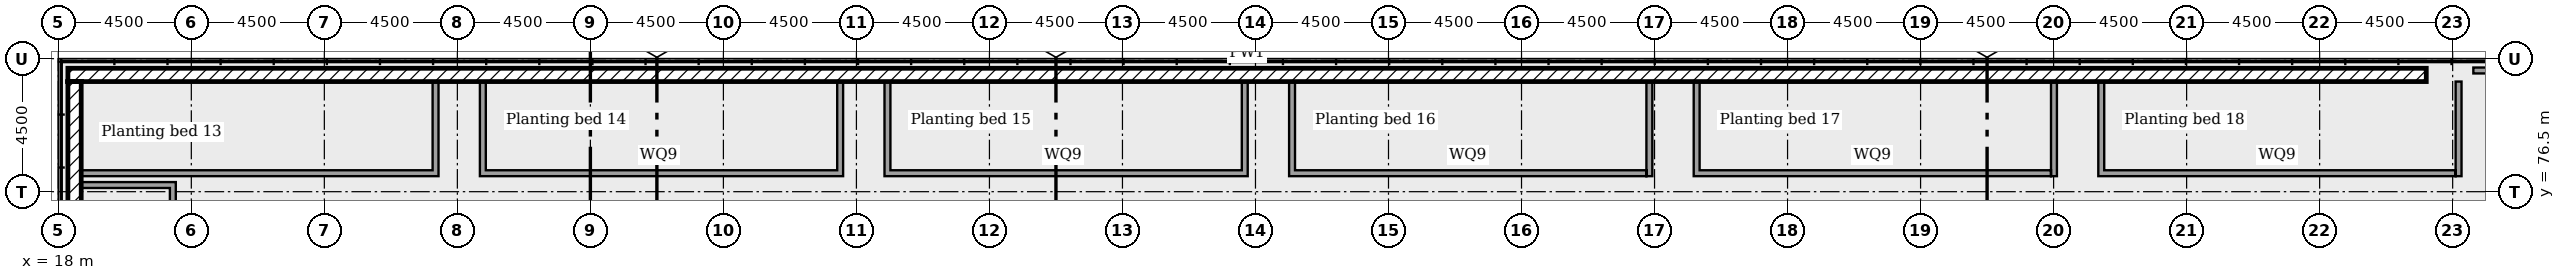
"""IFC4 building model, lengths in metres.
Left out: names, types, materials, properties, quantities, classifications, styles, units other than length and angle.
Written with IfcOpenShell. Run it as: python <this file> out.ifc"""

import sys

from ifc_helpers import new_model, si_unit, direction, frame, frame_2d, origin, place, context, subcontext, project, spatial, rectangle, extrude, element, save


model = new_model("IFC4")
c1 = context("Model", 3, precision=1e-05, world=origin(), true_north=direction((0.0, 1.0)))
c2 = subcontext(c1, "Body", "Model", "MODEL_VIEW")
j1 = project(units=[si_unit("LENGTHUNIT", "METRE"), si_unit("PLANEANGLEUNIT", "RADIAN")], contexts=[c1])
p1 = place(None, origin())
s1 = spatial("IfcSite", under=j1, at=p1, CompositionType="ELEMENT")
p2 = place(p1, origin())
s2 = spatial("IfcBuilding", under=s1, at=p2, CompositionType="ELEMENT")
p3 = place(p2, frame((0.0, 0.0, 16.5)))
s3 = spatial("IfcBuildingStorey", under=s2, at=p3, CompositionType="ELEMENT", Elevation=16.5)
p4 = place(p3, frame((98.107, 80.45, 0.0), z_axis=(0.0, 0.0, 1.0), x_axis=(-1.0, 0.0, 0.0)))
e1 = element("IfcWall", 1, at=p4, inside=s3, PredefinedType="SOLIDWALL", context=c2, shape_type="SweptSolid", body=[
    extrude(rectangle(XDim=79.782, YDim=0.45, at=frame_2d((39.891, 0.0))), origin(), (0.0, 0.0, 1.0), 0.6),
])
p5 = place(p3, frame((18.55, 80.225, 0.0), z_axis=(0.0, 0.0, 1.0), x_axis=(0.0, -1.0, 0.0)))
e2 = element("IfcWall", 2, at=p5, inside=s3, PredefinedType="SOLIDWALL", context=c2, shape_type="SweptSolid", body=[
    extrude(rectangle(XDim=47.133, YDim=0.45, at=frame_2d((23.566, 0.0))), origin(), (0.0, 0.0, 1.0), 0.6),
])
p6 = place(p3, frame((30.762, 77.025, 0.0), z_axis=(0.0, 0.0, 1.0), x_axis=(0.0, 1.0, 0.0)))
e3 = element("IfcWall", 3, at=p6, inside=s3, PredefinedType="SOLIDWALL", context=c2, shape_type="SweptSolid", body=[
    extrude(rectangle(XDim=3.2, YDim=0.2, at=frame_2d((1.6, 0.0))), origin(), (0.0, 0.0, 1.0), 0.45),
])
p7 = place(p3, frame((18.775, 77.125, 0.0)))
e4 = element("IfcWall", 4, at=p7, inside=s3, PredefinedType="SOLIDWALL", context=c2, shape_type="SweptSolid", body=[
    extrude(rectangle(XDim=11.888, YDim=0.2, at=frame_2d((5.944, 0.0))), origin(), (0.0, 0.0, 1.0), 0.45),
])
p8 = place(p3, frame((44.45, 77.025, 0.0), z_axis=(0.0, 0.0, 1.0), x_axis=(0.0, 1.0, 0.0)))
e5 = element("IfcWall", 5, at=p8, inside=s3, PredefinedType="SOLIDWALL", context=c2, shape_type="SweptSolid", body=[
    extrude(rectangle(XDim=3.2, YDim=0.2, at=frame_2d((1.6, 0.0))), origin(), (0.0, 0.0, 1.0), 0.45),
])
p9 = place(p3, frame((32.262, 77.125, 0.0)))
e6 = element("IfcWall", 6, at=p9, inside=s3, PredefinedType="SOLIDWALL", context=c2, shape_type="SweptSolid", body=[
    extrude(rectangle(XDim=12.088, YDim=0.2, at=frame_2d((6.044, 0.0))), origin(), (0.0, 0.0, 1.0), 0.45),
])
p10 = place(p3, frame((32.363, 77.225, 0.0), z_axis=(0.0, 0.0, 1.0), x_axis=(0.0, 1.0, 0.0)))
e7 = element("IfcWall", 7, at=p10, inside=s3, PredefinedType="SOLIDWALL", context=c2, shape_type="SweptSolid", body=[
    extrude(rectangle(XDim=3.0, YDim=0.2, at=frame_2d((1.5, 0.0))), origin(), (0.0, 0.0, 1.0), 0.45),
])
p11 = place(p3, frame((58.137, 77.025, 0.0), z_axis=(0.0, 0.0, 1.0), x_axis=(0.0, 1.0, 0.0)))
e8 = element("IfcWall", 8, at=p11, inside=s3, PredefinedType="SOLIDWALL", context=c2, shape_type="SweptSolid", body=[
    extrude(rectangle(XDim=3.2, YDim=0.2, at=frame_2d((1.6, 0.0))), origin(), (0.0, 0.0, 1.0), 0.45),
])
p12 = place(p3, frame((45.95, 77.125, 0.0)))
e9 = element("IfcWall", 9, at=p12, inside=s3, PredefinedType="SOLIDWALL", context=c2, shape_type="SweptSolid", body=[
    extrude(rectangle(XDim=12.088, YDim=0.2, at=frame_2d((6.044, 0.0))), origin(), (0.0, 0.0, 1.0), 0.45),
])
p13 = place(p3, frame((46.05, 77.225, 0.0), z_axis=(0.0, 0.0, 1.0), x_axis=(0.0, 1.0, 0.0)))
e10 = element("IfcWall", 10, at=p13, inside=s3, PredefinedType="SOLIDWALL", context=c2, shape_type="SweptSolid", body=[
    extrude(rectangle(XDim=3.0, YDim=0.2, at=frame_2d((1.5, 0.0))), origin(), (0.0, 0.0, 1.0), 0.45),
])
p14 = place(p3, frame((71.825, 77.025, 0.0), z_axis=(0.0, 0.0, 1.0), x_axis=(0.0, 1.0, 0.0)))
e11 = element("IfcWall", 11, at=p14, inside=s3, PredefinedType="SOLIDWALL", context=c2, shape_type="SweptSolid", body=[
    extrude(rectangle(XDim=3.2, YDim=0.2, at=frame_2d((1.6, 0.0))), origin(), (0.0, 0.0, 1.0), 0.45),
])
p15 = place(p3, frame((59.637, 77.125, 0.0)))
e12 = element("IfcWall", 12, at=p15, inside=s3, PredefinedType="SOLIDWALL", context=c2, shape_type="SweptSolid", body=[
    extrude(rectangle(XDim=12.088, YDim=0.2, at=frame_2d((6.044, 0.0))), origin(), (0.0, 0.0, 1.0), 0.45),
])
p16 = place(p3, frame((59.738, 77.225, 0.0), z_axis=(0.0, 0.0, 1.0), x_axis=(0.0, 1.0, 0.0)))
e13 = element("IfcWall", 13, at=p16, inside=s3, PredefinedType="SOLIDWALL", context=c2, shape_type="SweptSolid", body=[
    extrude(rectangle(XDim=3.0, YDim=0.2, at=frame_2d((1.5, 0.0))), origin(), (0.0, 0.0, 1.0), 0.45),
])
p17 = place(p3, frame((85.512, 77.025, 0.0), z_axis=(0.0, 0.0, 1.0), x_axis=(0.0, 1.0, 0.0)))
e14 = element("IfcWall", 14, at=p17, inside=s3, PredefinedType="SOLIDWALL", context=c2, shape_type="SweptSolid", body=[
    extrude(rectangle(XDim=3.2, YDim=0.2, at=frame_2d((1.6, 0.0))), origin(), (0.0, 0.0, 1.0), 0.45),
])
p18 = place(p3, frame((73.325, 77.125, 0.0)))
e15 = element("IfcWall", 15, at=p18, inside=s3, PredefinedType="SOLIDWALL", context=c2, shape_type="SweptSolid", body=[
    extrude(rectangle(XDim=12.088, YDim=0.2, at=frame_2d((6.044, 0.0))), origin(), (0.0, 0.0, 1.0), 0.45),
])
p19 = place(p3, frame((73.425, 77.225, 0.0), z_axis=(0.0, 0.0, 1.0), x_axis=(0.0, 1.0, 0.0)))
e16 = element("IfcWall", 16, at=p19, inside=s3, PredefinedType="SOLIDWALL", context=c2, shape_type="SweptSolid", body=[
    extrude(rectangle(XDim=3.0, YDim=0.2, at=frame_2d((1.5, 0.0))), origin(), (0.0, 0.0, 1.0), 0.45),
])
p20 = place(p3, frame((99.2, 77.025, 0.0), z_axis=(0.0, 0.0, 1.0), x_axis=(0.0, 1.0, 0.0)))
e17 = element("IfcWall", 17, at=p20, inside=s3, PredefinedType="SOLIDWALL", context=c2, shape_type="SweptSolid", body=[
    extrude(rectangle(XDim=3.2, YDim=0.2, at=frame_2d((1.6, 0.0))), origin(), (0.0, 0.0, 1.0), 0.45),
])
p21 = place(p3, frame((87.012, 77.125, 0.0)))
e18 = element("IfcWall", 18, at=p21, inside=s3, PredefinedType="SOLIDWALL", context=c2, shape_type="SweptSolid", body=[
    extrude(rectangle(XDim=12.088, YDim=0.2, at=frame_2d((6.044, 0.0))), origin(), (0.0, 0.0, 1.0), 0.45),
])
p22 = place(p3, frame((87.113, 77.225, 0.0), z_axis=(0.0, 0.0, 1.0), x_axis=(0.0, 1.0, 0.0)))
e19 = element("IfcWall", 19, at=p22, inside=s3, PredefinedType="SOLIDWALL", context=c2, shape_type="SweptSolid", body=[
    extrude(rectangle(XDim=3.0, YDim=0.2, at=frame_2d((1.5, 0.0))), origin(), (0.0, 0.0, 1.0), 0.45),
])
p23 = place(p3, frame((21.875, 62.783, 0.0), z_axis=(0.0, 0.0, 1.0), x_axis=(0.0, 1.0, 0.0)))
e20 = element("IfcWall", 20, at=p23, inside=s3, PredefinedType="SOLIDWALL", context=c2, shape_type="SweptSolid", body=[
    extrude(rectangle(XDim=14.042, YDim=0.2, at=frame_2d((7.021, 0.0))), origin(), (0.0, 0.0, 1.0), 0.45),
])
p24 = place(p3, frame((18.775, 76.725, 0.0)))
e21 = element("IfcWall", 21, at=p24, inside=s3, PredefinedType="SOLIDWALL", context=c2, shape_type="SweptSolid", body=[
    extrude(rectangle(XDim=3.0, YDim=0.2, at=frame_2d((1.5, 0.0))), origin(), (0.0, 0.0, 1.0), 0.45),
])
p25 = place(p3, frame((99.7, 80.6, 0.0)))
e22 = element("IfcWall", 22, at=p25, inside=s3, PredefinedType="SOLIDWALL", context=c2, shape_type="SweptSolid", body=[
    extrude(rectangle(XDim=3.8, YDim=0.2, at=frame_2d((1.9, 0.0))), origin(), (0.0, 0.0, 1.0), 2.3),
])
p26 = place(p25, frame((0.6, 0.0, 0.0)))
e23 = element("IfcOpeningElement", 23, at=p26, cuts=e22, PredefinedType="OPENING", context=c2, shape_type="SweptSolid", body=[
    extrude(rectangle(XDim=2.6, YDim=2.1, at=frame_2d((1.3, 1.05))), frame((0.0, 0.11, 0.0), z_axis=(0.0, -1.0, 0.0), x_axis=(1.0, 0.0, 0.0)), (0.0, 0.0, 1.0), 0.22),
])
save(model, sys.argv[1])
